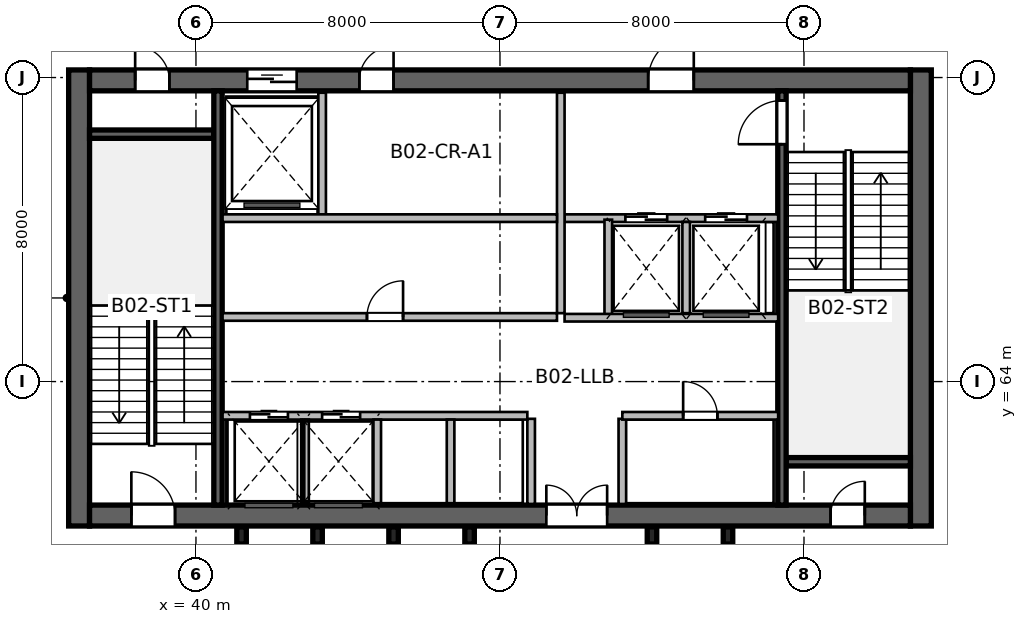
"""IFC4 building model, lengths in metres.
Left out: names, types, materials, properties, quantities, classifications, styles, units other than length and angle.
Written with IfcOpenShell. Run it as: python <this file> out.ifc"""

import sys

from ifc_helpers import new_model, si_unit, direction, frame, frame_2d, origin, origin_2d, place, context, subcontext, project, spatial, rectangle, extrude, source, transform, mapped, element, fill, save


model = new_model("IFC4")
c1 = context("Model", 3, precision=1e-05, world=origin(), true_north=direction((0.0, 1.0)))
c2 = subcontext(c1, "Body", "Model", "MODEL_VIEW")
j1 = project(units=[si_unit("LENGTHUNIT", "METRE"), si_unit("PLANEANGLEUNIT", "RADIAN")], contexts=[c1])
p1 = place(None, origin())
s1 = spatial("IfcSite", under=j1, at=p1, CompositionType="ELEMENT")
p2 = place(p1, origin())
s2 = spatial("IfcBuilding", under=s1, at=p2, CompositionType="ELEMENT")
p3 = place(p2, frame((0.0, 0.0, -10.0)))
s3 = spatial("IfcBuildingStorey", under=s2, at=p3, CompositionType="ELEMENT", Elevation=-10.0)
m1 = source(origin(), c2, "Body", "SweptSolid", [
    extrude(rectangle(XDim=12.0, YDim=0.55, at=frame_2d((6.0, 0.0))), origin(), (0.0, 0.0, 1.0), 5.0),
])
for number, where, z_axis, x_axis in (
    (1, (36.925, 60.2, 0.0), (0.0, 0.0, 1.0), (0.0, 1.0, 0.0)),
    (2, (59.075, 60.2, 0.0), (0.0, 0.0, 1.0), (0.0, 1.0, 0.0)),
):
    element("IfcWall", number, at=place(p3, frame(where, z_axis=z_axis, x_axis=x_axis)), inside=s3, PredefinedType="SHEAR", context=c2, shape_type="MappedRepresentation", body=[
        mapped(m1, transform((0.0, 0.0, 0.0), scale=1.0)),
    ])
m2 = source(origin(), c2, "Body", "SweptSolid", [
    extrude(rectangle(XDim=21.6, YDim=0.55, at=frame_2d((10.8, 0.0))), origin(), (0.0, 0.0, 1.0), 5.0),
])
p4 = place(p3, frame((37.2, 60.475, 0.0), z_axis=(0.0, 0.0, 1.0), x_axis=(1.0, 0.0, 0.0)))
e3 = element("IfcWall", 3, at=p4, inside=s3, PredefinedType="SHEAR", context=c2, shape_type="MappedRepresentation", body=[
    mapped(m2, transform((0.0, 0.0, 0.0), scale=1.0)),
])
p5 = place(p4, frame((1.1, 0.0, 0.0)))
e4 = element("IfcOpeningElement", 4, at=p5, cuts=e3, PredefinedType="OPENING", context=c2, shape_type="SweptSolid", body=[
    extrude(rectangle(XDim=1.15, YDim=2.15, at=frame_2d((0.575, 1.075))), frame((0.0, 0.285, 0.0), z_axis=(0.0, -1.0, 0.0), x_axis=(1.0, 0.0, 0.0)), (0.0, 0.0, 1.0), 0.57),
])
p6 = place(p4, frame((19.5, 0.0, 0.0)))
e5 = element("IfcOpeningElement", 5, at=p6, cuts=e3, PredefinedType="OPENING", context=c2, shape_type="SweptSolid", body=[
    extrude(rectangle(XDim=0.9, YDim=2.1, at=frame_2d((0.45, 1.05))), frame((0.0, 0.285, 0.0), z_axis=(0.0, -1.0, 0.0), x_axis=(1.0, 0.0, 0.0)), (0.0, 0.0, 1.0), 0.57),
])
p7 = place(p4, frame((12.02, 0.0, 0.0)))
e6 = element("IfcOpeningElement", 6, at=p7, cuts=e3, PredefinedType="OPENING", context=c2, shape_type="SweptSolid", body=[
    extrude(rectangle(XDim=1.6, YDim=2.15, at=frame_2d((0.8, 1.075))), frame((0.0, 0.285, 0.0), z_axis=(0.0, -1.0, 0.0), x_axis=(1.0, 0.0, 0.0)), (0.0, 0.0, 1.0), 0.57),
])
p8 = place(p3, frame((37.2, 71.925, 0.0), z_axis=(0.0, 0.0, 1.0), x_axis=(1.0, 0.0, 0.0)))
e7 = element("IfcWall", 7, at=p8, inside=s3, PredefinedType="SHEAR", context=c2, shape_type="MappedRepresentation", body=[
    mapped(m2, transform((0.0, 0.0, 0.0), scale=1.0)),
])
p9 = place(p8, frame((1.2, 0.0, 0.0)))
e8 = element("IfcOpeningElement", 8, at=p9, cuts=e7, PredefinedType="OPENING", context=c2, shape_type="SweptSolid", body=[
    extrude(rectangle(XDim=0.9, YDim=2.1, at=frame_2d((0.45, 1.05))), frame((0.0, 0.285, 0.0), z_axis=(0.0, -1.0, 0.0), x_axis=(1.0, 0.0, 0.0)), (0.0, 0.0, 1.0), 0.57),
])
p10 = place(p8, frame((14.7, 0.0, 0.0)))
e9 = element("IfcOpeningElement", 9, at=p10, cuts=e7, PredefinedType="OPENING", context=c2, shape_type="SweptSolid", body=[
    extrude(rectangle(XDim=1.2, YDim=2.15, at=frame_2d((0.6, 1.075))), frame((0.0, 0.285, 0.0), z_axis=(0.0, -1.0, 0.0), x_axis=(1.0, 0.0, 0.0)), (0.0, 0.0, 1.0), 0.57),
])
p11 = place(p8, frame((4.15, 0.0, 0.0)))
e10 = element("IfcOpeningElement", 10, at=p11, cuts=e7, PredefinedType="OPENING", context=c2, shape_type="SweptSolid", body=[
    extrude(rectangle(XDim=1.3, YDim=2.15, at=frame_2d((0.65, 1.075))), frame((0.0, 0.285, 0.0), z_axis=(0.0, -1.0, 0.0), x_axis=(1.0, 0.0, 0.0)), (0.0, 0.0, 1.0), 0.57),
])
p12 = place(p8, frame((7.1, 0.0, 0.0)))
e11 = element("IfcOpeningElement", 11, at=p12, cuts=e7, PredefinedType="OPENING", context=c2, shape_type="SweptSolid", body=[
    extrude(rectangle(XDim=0.9, YDim=2.1, at=frame_2d((0.45, 1.05))), frame((0.0, 0.285, 0.0), z_axis=(0.0, -1.0, 0.0), x_axis=(1.0, 0.0, 0.0)), (0.0, 0.0, 1.0), 0.57),
])
m3 = source(origin(), c2, "Body", "SweptSolid", [
    extrude(rectangle(XDim=3.27, YDim=0.22, at=frame_2d((1.635, 0.0))), origin(), (0.0, 0.0, 1.0), 5.0),
])
for number, where, z_axis, x_axis in (
    (12, (37.2, 70.51, 0.0), (0.0, 0.0, 1.0), (1.0, 0.0, 0.0)),
    (13, (55.53, 61.89, 0.0), (0.0, 0.0, 1.0), (1.0, 0.0, 0.0)),
):
    element("IfcWall", number, at=place(p3, frame(where, z_axis=z_axis, x_axis=x_axis)), inside=s3, PredefinedType="SHEAR", context=c2, shape_type="MappedRepresentation", body=[
        mapped(m3, transform((0.0, 0.0, 0.0), scale=1.0)),
    ])
m4 = source(origin(), c2, "Body", "SweptSolid", [
    extrude(rectangle(XDim=10.9, YDim=0.22, at=frame_2d((5.45, 0.0))), origin(), (0.0, 0.0, 1.0), 5.0),
])
p13 = place(p3, frame((40.58, 60.75, 0.0), z_axis=(0.0, 0.0, 1.0), x_axis=(0.0, 1.0, 0.0)))
e14 = element("IfcWall", 14, at=p13, inside=s3, PredefinedType="SHEAR", context=c2, shape_type="MappedRepresentation", body=[
    mapped(m4, transform((0.0, 0.0, 0.0), scale=1.0)),
])
p14 = place(p3, frame((55.42, 60.75, 0.0), z_axis=(0.0, 0.0, 1.0), x_axis=(0.0, 1.0, 0.0)))
e15 = element("IfcWall", 15, at=p14, inside=s3, PredefinedType="SHEAR", context=c2, shape_type="MappedRepresentation", body=[
    mapped(m4, transform((0.0, 0.0, 0.0), scale=1.0)),
])
p15 = place(p14, frame((9.495, 0.0, 0.0)))
e16 = element("IfcOpeningElement", 16, at=p15, cuts=e15, PredefinedType="OPENING", context=c2, shape_type="SweptSolid", body=[
    extrude(rectangle(XDim=1.15, YDim=2.15, at=frame_2d((0.575, 1.075))), frame((0.0, 0.12, 0.0), z_axis=(0.0, -1.0, 0.0), x_axis=(1.0, 0.0, 0.0)), (0.0, 0.0, 1.0), 0.24),
])
m5 = source(origin(), c2, "Body", "SweptSolid", [
    extrude(rectangle(XDim=2.24, YDim=0.2, at=frame_2d((1.12, 0.0))), origin(), (0.0, 0.0, 1.0), 4.7),
])
for number, where, z_axis, x_axis in (
    (17, (48.82, 60.78, 0.0), (0.0, 0.0, 1.0), (0.0, 1.0, 0.0)),
    (18, (51.22, 60.78, 0.0), (0.0, 0.0, 1.0), (0.0, 1.0, 0.0)),
):
    element("IfcWall", number, at=place(p3, frame(where, z_axis=z_axis, x_axis=x_axis)), inside=s3, PredefinedType="SOLIDWALL", context=c2, shape_type="MappedRepresentation", body=[
        mapped(m5, transform((0.0, 0.0, 0.0), scale=1.0)),
    ])
m6 = source(origin(), c2, "Body", "SweptSolid", [
    extrude(rectangle(XDim=5.62, YDim=0.2, at=frame_2d((2.81, 0.0))), origin(), (0.0, 0.0, 1.0), 4.7),
])
p16 = place(p3, frame((49.7, 68.3, 0.0), z_axis=(0.0, 0.0, 1.0), x_axis=(1.0, 0.0, 0.0)))
e19 = element("IfcWall", 19, at=p16, inside=s3, PredefinedType="SOLIDWALL", context=c2, shape_type="MappedRepresentation", body=[
    mapped(m6, transform((0.0, 0.0, 0.0), scale=1.0)),
])
p17 = place(p16, frame((1.6, 0.0, 0.0)))
e20 = element("IfcOpeningElement", 20, at=p17, cuts=e19, PredefinedType="OPENING", context=c2, shape_type="SweptSolid", body=[
    extrude(rectangle(XDim=1.1, YDim=2.15, at=frame_2d((0.55, 1.075))), frame((0.0, 0.11, 0.0), z_axis=(0.0, -1.0, 0.0), x_axis=(1.0, 0.0, 0.0)), (0.0, 0.0, 1.0), 0.22),
])
p18 = place(p16, frame((3.7, 0.0, 0.0)))
e21 = element("IfcOpeningElement", 21, at=p18, cuts=e19, PredefinedType="OPENING", context=c2, shape_type="SweptSolid", body=[
    extrude(rectangle(XDim=1.1, YDim=2.15, at=frame_2d((0.55, 1.075))), frame((0.0, 0.11, 0.0), z_axis=(0.0, -1.0, 0.0), x_axis=(1.0, 0.0, 0.0)), (0.0, 0.0, 1.0), 0.22),
])
m7 = source(origin(), c2, "Body", "SweptSolid", [
    extrude(rectangle(XDim=5.8, YDim=0.2, at=frame_2d((2.9, 0.0))), origin(), (0.0, 0.0, 1.0), 4.7),
])
p19 = place(p3, frame((49.6, 65.8, 0.0), z_axis=(0.0, 0.0, 1.0), x_axis=(0.0, 1.0, 0.0)))
e22 = element("IfcWall", 22, at=p19, inside=s3, PredefinedType="SOLIDWALL", context=c2, shape_type="MappedRepresentation", body=[
    mapped(m7, transform((0.0, 0.0, 0.0), scale=1.0)),
])
m8 = source(origin(), c2, "Body", "SweptSolid", [
    extrude(rectangle(XDim=2.58, YDim=0.2, at=frame_2d((1.29, 0.0))), origin(), (0.0, 0.0, 1.0), 4.7),
])
p20 = place(p3, frame((50.85, 65.68, 0.0), z_axis=(0.0, 0.0, 1.0), x_axis=(0.0, 1.0, 0.0)))
e23 = element("IfcWall", 23, at=p20, inside=s3, PredefinedType="SOLIDWALL", context=c2, shape_type="MappedRepresentation", body=[
    mapped(m8, transform((0.0, 0.0, 0.0), scale=1.0)),
])
m9 = source(origin(), c2, "Body", "SweptSolid", [
    extrude(rectangle(XDim=2.4, YDim=0.2, at=frame_2d((1.2, 0.0))), origin(), (0.0, 0.0, 1.0), 4.7),
])
p21 = place(p3, frame((52.9, 65.8, 0.0), z_axis=(0.0, 0.0, 1.0), x_axis=(0.0, 1.0, 0.0)))
e24 = element("IfcWall", 24, at=p21, inside=s3, PredefinedType="SOLIDWALL", context=c2, shape_type="MappedRepresentation", body=[
    mapped(m9, transform((0.0, 0.0, 0.0), scale=1.0)),
])
p22 = place(p3, frame((49.7, 65.68, 0.0), z_axis=(0.0, 0.0, 1.0), x_axis=(1.0, 0.0, 0.0)))
e25 = element("IfcWall", 25, at=p22, inside=s3, PredefinedType="SOLIDWALL", context=c2, shape_type="MappedRepresentation", body=[
    mapped(m6, transform((0.0, 0.0, 0.0), scale=1.0)),
])
m10 = source(origin(), c2, "Body", "SweptSolid", [
    extrude(rectangle(XDim=3.2, YDim=0.2, at=frame_2d((1.6, 0.0))), origin(), (0.0, 0.0, 1.0), 4.7),
])
p23 = place(p3, frame((43.32, 68.4, 0.0), z_axis=(0.0, 0.0, 1.0), x_axis=(0.0, 1.0, 0.0)))
e26 = element("IfcWall", 26, at=p23, inside=s3, PredefinedType="SOLIDWALL", context=c2, shape_type="MappedRepresentation", body=[
    mapped(m10, transform((0.0, 0.0, 0.0), scale=1.0)),
])
m11 = source(origin(), c2, "Body", "SweptSolid", [
    extrude(rectangle(XDim=8.8, YDim=0.2, at=frame_2d((4.4, 0.0))), origin(), (0.0, 0.0, 1.0), 4.7),
])
p24 = place(p3, frame((40.7, 68.3, 0.0), z_axis=(0.0, 0.0, 1.0), x_axis=(1.0, 0.0, 0.0)))
e27 = element("IfcWall", 27, at=p24, inside=s3, PredefinedType="SOLIDWALL", context=c2, shape_type="MappedRepresentation", body=[
    mapped(m11, transform((0.0, 0.0, 0.0), scale=1.0)),
])
m12 = source(origin(), c2, "Body", "SweptSolid", [
    extrude(rectangle(XDim=8.02, YDim=0.2, at=frame_2d((4.01, 0.0))), origin(), (0.0, 0.0, 1.0), 4.7),
])
p25 = place(p3, frame((40.7, 63.1, 0.0), z_axis=(0.0, 0.0, 1.0), x_axis=(1.0, 0.0, 0.0)))
e28 = element("IfcWall", 28, at=p25, inside=s3, PredefinedType="SOLIDWALL", context=c2, shape_type="MappedRepresentation", body=[
    mapped(m12, transform((0.0, 0.0, 0.0), scale=1.0)),
])
p26 = place(p25, frame((0.72, 0.0, 0.0)))
e29 = element("IfcOpeningElement", 29, at=p26, cuts=e28, PredefinedType="OPENING", context=c2, shape_type="SweptSolid", body=[
    extrude(rectangle(XDim=1.0, YDim=2.15, at=frame_2d((0.5, 1.075))), frame((0.0, 0.11, 0.0), z_axis=(0.0, -1.0, 0.0), x_axis=(1.0, 0.0, 0.0)), (0.0, 0.0, 1.0), 0.22),
])
p27 = place(p25, frame((2.62, 0.0, 0.0)))
e30 = element("IfcOpeningElement", 30, at=p27, cuts=e28, PredefinedType="OPENING", context=c2, shape_type="SweptSolid", body=[
    extrude(rectangle(XDim=1.0, YDim=2.15, at=frame_2d((0.5, 1.075))), frame((0.0, 0.11, 0.0), z_axis=(0.0, -1.0, 0.0), x_axis=(1.0, 0.0, 0.0)), (0.0, 0.0, 1.0), 0.22),
])
m13 = source(origin(), c2, "Body", "SweptSolid", [
    extrude(rectangle(XDim=4.1, YDim=0.2, at=frame_2d((2.05, 0.0))), origin(), (0.0, 0.0, 1.0), 4.7),
])
p28 = place(p3, frame((51.22, 63.1, 0.0), z_axis=(0.0, 0.0, 1.0), x_axis=(1.0, 0.0, 0.0)))
e31 = element("IfcWall", 31, at=p28, inside=s3, PredefinedType="SOLIDWALL", context=c2, shape_type="MappedRepresentation", body=[
    mapped(m13, transform((0.0, 0.0, 0.0), scale=1.0)),
])
p29 = place(p28, frame((1.6, 0.0, 0.0)))
e32 = element("IfcOpeningElement", 32, at=p29, cuts=e31, PredefinedType="OPENING", context=c2, shape_type="SweptSolid", body=[
    extrude(rectangle(XDim=0.9, YDim=2.1, at=frame_2d((0.45, 1.05))), frame((0.0, 0.11, 0.0), z_axis=(0.0, -1.0, 0.0), x_axis=(1.0, 0.0, 0.0)), (0.0, 0.0, 1.0), 0.22),
])
m14 = source(origin(), c2, "Body", "SweptSolid", [
    extrude(rectangle(XDim=2.2, YDim=0.2, at=frame_2d((1.1, 0.0))), origin(), (0.0, 0.0, 1.0), 4.7),
])
for number, where, z_axis, x_axis in (
    (33, (42.87, 60.8, 0.0), (0.0, 0.0, 1.0), (0.0, 1.0, 0.0)),
    (34, (44.77, 60.8, 0.0), (0.0, 0.0, 1.0), (0.0, 1.0, 0.0)),
    (35, (46.7, 60.8, 0.0), (0.0, 0.0, 1.0), (0.0, 1.0, 0.0)),
):
    element("IfcWall", number, at=place(p3, frame(where, z_axis=z_axis, x_axis=x_axis)), inside=s3, PredefinedType="SOLIDWALL", context=c2, shape_type="MappedRepresentation", body=[
        mapped(m14, transform((0.0, 0.0, 0.0), scale=1.0)),
    ])
p30 = place(p3, frame((40.7, 65.7, 0.0), z_axis=(0.0, 0.0, 1.0), x_axis=(1.0, 0.0, 0.0)))
e36 = element("IfcWall", 36, at=p30, inside=s3, PredefinedType="SOLIDWALL", context=c2, shape_type="MappedRepresentation", body=[
    mapped(m11, transform((0.0, 0.0, 0.0), scale=1.0)),
])
p31 = place(p30, frame((3.8, 0.0, 0.0)))
e37 = element("IfcOpeningElement", 37, at=p31, cuts=e36, PredefinedType="OPENING", context=c2, shape_type="SweptSolid", body=[
    extrude(rectangle(XDim=0.95, YDim=2.15, at=frame_2d((0.475, 1.075))), frame((0.0, 0.11, 0.0), z_axis=(0.0, -1.0, 0.0), x_axis=(1.0, 0.0, 0.0)), (0.0, 0.0, 1.0), 0.22),
])
m15 = source(origin(), c2, "Body", "SweptSolid", [
    extrude(rectangle(XDim=0.45, YDim=0.25, at=origin_2d()), origin(), (0.0, 0.0, 1.0), 4.68),
])
for number, where, z_axis, x_axis in (
    (38, (41.2, 59.95, 0.0), (0.0, 0.0, 1.0), (1.0, 0.0, 0.0)),
    (39, (43.2, 59.95, 0.0), (0.0, 0.0, 1.0), (1.0, 0.0, 0.0)),
    (40, (45.2, 59.95, 0.0), (0.0, 0.0, 1.0), (1.0, 0.0, 0.0)),
    (41, (47.2, 59.95, 0.0), (0.0, 0.0, 1.0), (1.0, 0.0, 0.0)),
    (42, (52.0, 59.95, 0.0), (0.0, 0.0, 1.0), (1.0, 0.0, 0.0)),
    (43, (54.0, 59.95, 0.0), (0.0, 0.0, 1.0), (1.0, 0.0, 0.0)),
):
    element("IfcColumn", number, at=place(p3, frame(where, z_axis=z_axis, x_axis=x_axis)), inside=s3, PredefinedType="PILASTER", context=c2, shape_type="MappedRepresentation", body=[
        mapped(m15, transform((0.0, 0.0, 0.0), scale=1.0)),
    ])
m16 = source(origin(), c2, "Body", "SweptSolid", [
    extrude(rectangle(XDim=1.15, YDim=2.15, at=frame_2d((0.575, 1.075))), frame((0.0, 0.025, 0.0), z_axis=(0.0, -1.0, 0.0), x_axis=(1.0, 0.0, 0.0)), (0.0, 0.0, 1.0), 0.05),
])
p32 = place(p5, origin())
e44 = element("IfcDoor", 44, at=p32, inside=s3, OperationType="SINGLE_SWING_LEFT", PredefinedType="DOOR", context=c2, shape_type="MappedRepresentation", body=[
    mapped(m16, transform((0.0, 0.0, 0.0), scale=1.0)),
])
fill(e4, e44)
m17 = source(origin(), c2, "Body", "SweptSolid", [
    extrude(rectangle(XDim=0.9, YDim=2.1, at=frame_2d((0.45, 1.05))), frame((0.0, 0.025, 0.0), z_axis=(0.0, -1.0, 0.0), x_axis=(1.0, 0.0, 0.0)), (0.0, 0.0, 1.0), 0.05),
])
p33 = place(p9, origin())
e45 = element("IfcDoor", 45, at=p33, inside=s3, OperationType="SINGLE_SWING_LEFT", PredefinedType="DOOR", context=c2, shape_type="MappedRepresentation", body=[
    mapped(m17, transform((0.0, 0.0, 0.0), scale=1.0)),
])
fill(e8, e45)
p34 = place(p6, origin())
e46 = element("IfcDoor", 46, at=p34, inside=s3, OperationType="SINGLE_SWING_RIGHT", PredefinedType="DOOR", context=c2, shape_type="MappedRepresentation", body=[
    mapped(m17, transform((0.0, 0.0, 0.0), scale=1.0)),
])
fill(e5, e46)
p35 = place(p15, origin())
e47 = element("IfcDoor", 47, at=p35, inside=s3, OperationType="SINGLE_SWING_LEFT", PredefinedType="DOOR", context=c2, shape_type="MappedRepresentation", body=[
    mapped(m16, transform((0.0, 0.0, 0.0), scale=1.0)),
])
fill(e16, e47)
m18 = source(origin(), c2, "Body", "SweptSolid", [
    extrude(rectangle(XDim=1.6, YDim=2.15, at=frame_2d((0.8, 1.075))), frame((0.0, 0.025, 0.0), z_axis=(0.0, -1.0, 0.0), x_axis=(1.0, 0.0, 0.0)), (0.0, 0.0, 1.0), 0.05),
])
p36 = place(p7, origin())
e48 = element("IfcDoor", 48, at=p36, inside=s3, OperationType="DOUBLE_DOOR_SINGLE_SWING", PredefinedType="DOOR", context=c2, shape_type="MappedRepresentation", body=[
    mapped(m18, transform((0.0, 0.0, 0.0), scale=1.0)),
])
fill(e6, e48)
m19 = source(origin(), c2, "Body", "SweptSolid", [
    extrude(rectangle(XDim=1.2, YDim=2.15, at=frame_2d((0.6, 1.075))), frame((0.0, 0.025, 0.0), z_axis=(0.0, -1.0, 0.0), x_axis=(1.0, 0.0, 0.0)), (0.0, 0.0, 1.0), 0.05),
])
p37 = place(p10, origin())
e49 = element("IfcDoor", 49, at=p37, inside=s3, OperationType="SINGLE_SWING_RIGHT", PredefinedType="DOOR", context=c2, shape_type="MappedRepresentation", body=[
    mapped(m19, transform((0.0, 0.0, 0.0), scale=1.0)),
])
fill(e9, e49)
m20 = source(origin(), c2, "Body", "SweptSolid", [
    extrude(rectangle(XDim=1.1, YDim=2.15, at=frame_2d((0.55, 1.075))), frame((0.0, 0.025, 0.0), z_axis=(0.0, -1.0, 0.0), x_axis=(1.0, 0.0, 0.0)), (0.0, 0.0, 1.0), 0.05),
])
p38 = place(p17, origin())
e50 = element("IfcDoor", 50, at=p38, inside=s3, OperationType="DOUBLE_DOOR_SLIDING", PredefinedType="DOOR", context=c2, shape_type="MappedRepresentation", body=[
    mapped(m20, transform((0.0, 0.0, 0.0), scale=1.0)),
])
fill(e20, e50)
p39 = place(p18, origin())
e51 = element("IfcDoor", 51, at=p39, inside=s3, OperationType="DOUBLE_DOOR_SLIDING", PredefinedType="DOOR", context=c2, shape_type="MappedRepresentation", body=[
    mapped(m20, transform((0.0, 0.0, 0.0), scale=1.0)),
])
fill(e21, e51)
m21 = source(origin(), c2, "Body", "SweptSolid", [
    extrude(rectangle(XDim=1.3, YDim=2.15, at=frame_2d((0.65, 1.075))), frame((0.0, 0.025, 0.0), z_axis=(0.0, -1.0, 0.0), x_axis=(1.0, 0.0, 0.0)), (0.0, 0.0, 1.0), 0.05),
])
p40 = place(p11, origin())
e52 = element("IfcDoor", 52, at=p40, inside=s3, OperationType="DOUBLE_DOOR_SLIDING", PredefinedType="DOOR", context=c2, shape_type="MappedRepresentation", body=[
    mapped(m21, transform((0.0, 0.0, 0.0), scale=1.0)),
])
fill(e10, e52)
p41 = place(p12, origin())
e53 = element("IfcDoor", 53, at=p41, inside=s3, OperationType="SINGLE_SWING_RIGHT", PredefinedType="DOOR", context=c2, shape_type="MappedRepresentation", body=[
    mapped(m17, transform((0.0, 0.0, 0.0), scale=1.0)),
])
fill(e11, e53)
m22 = source(origin(), c2, "Body", "SweptSolid", [
    extrude(rectangle(XDim=1.0, YDim=2.15, at=frame_2d((0.5, 1.075))), frame((0.0, 0.025, 0.0), z_axis=(0.0, -1.0, 0.0), x_axis=(1.0, 0.0, 0.0)), (0.0, 0.0, 1.0), 0.05),
])
p42 = place(p26, origin())
e54 = element("IfcDoor", 54, at=p42, inside=s3, OperationType="DOUBLE_DOOR_SLIDING", PredefinedType="DOOR", context=c2, shape_type="MappedRepresentation", body=[
    mapped(m22, transform((0.0, 0.0, 0.0), scale=1.0)),
])
fill(e29, e54)
p43 = place(p27, origin())
e55 = element("IfcDoor", 55, at=p43, inside=s3, OperationType="DOUBLE_DOOR_SLIDING", PredefinedType="DOOR", context=c2, shape_type="MappedRepresentation", body=[
    mapped(m22, transform((0.0, 0.0, 0.0), scale=1.0)),
])
fill(e30, e55)
p44 = place(p29, origin())
e56 = element("IfcDoor", 56, at=p44, inside=s3, OperationType="SINGLE_SWING_LEFT", PredefinedType="DOOR", context=c2, shape_type="MappedRepresentation", body=[
    mapped(m17, transform((0.0, 0.0, 0.0), scale=1.0)),
])
fill(e32, e56)
m23 = source(origin(), c2, "Body", "SweptSolid", [
    extrude(rectangle(XDim=0.95, YDim=2.15, at=frame_2d((0.475, 1.075))), frame((0.0, 0.025, 0.0), z_axis=(0.0, -1.0, 0.0), x_axis=(1.0, 0.0, 0.0)), (0.0, 0.0, 1.0), 0.05),
])
p45 = place(p31, origin())
e57 = element("IfcDoor", 57, at=p45, inside=s3, OperationType="SINGLE_SWING_RIGHT", PredefinedType="DOOR", context=c2, shape_type="MappedRepresentation", body=[
    mapped(m23, transform((0.0, 0.0, 0.0), scale=1.0)),
])
fill(e37, e57)
save(model, sys.argv[1])
